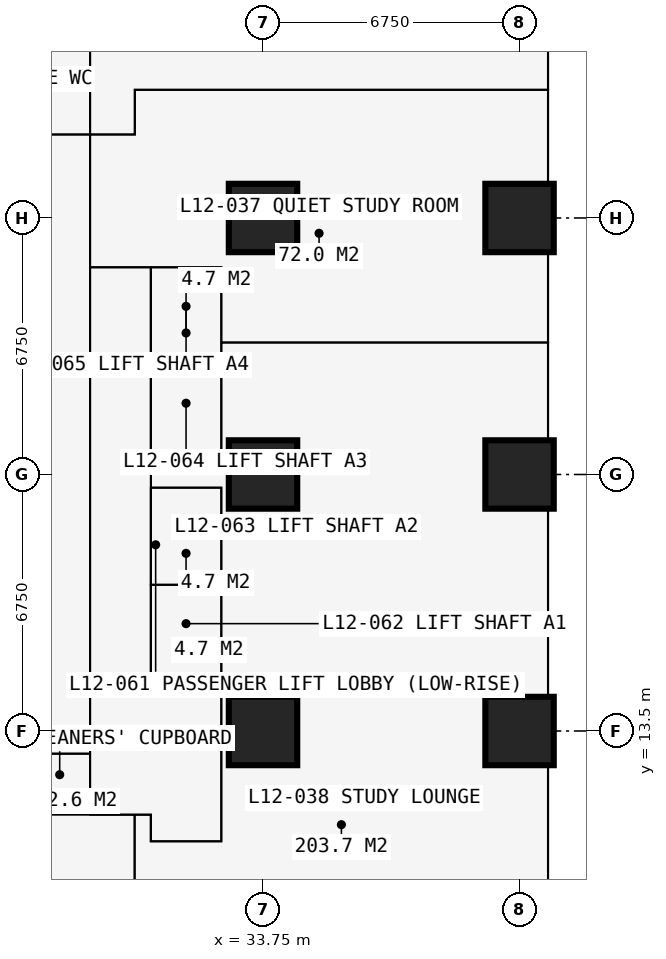
"""IFC4 building model, lengths in metres.
Left out: names, types, materials, properties, quantities, classifications, styles, units other than length and angle.
Written with IfcOpenShell. Run it as: python <this file> out.ifc"""

import sys

from ifc_helpers import new_model, si_unit, direction, frame, frame_2d, origin, origin_2d, place, context, subcontext, project, spatial, rectangle, extrude, element, fill, save


model = new_model("IFC4")
c1 = context("Model", 3, precision=1e-05, world=origin(), true_north=direction((0.0, 1.0)))
c2 = subcontext(c1, "Body", "Model", "MODEL_VIEW")
j1 = project(units=[si_unit("LENGTHUNIT", "METRE"), si_unit("PLANEANGLEUNIT", "RADIAN")], contexts=[c1])
p1 = place(None, origin())
s1 = spatial("IfcSite", under=j1, at=p1, CompositionType="ELEMENT")
p2 = place(p1, origin())
s2 = spatial("IfcBuilding", under=s1, at=p2, CompositionType="ELEMENT")
p3 = place(p2, frame((0.0, 0.0, 46.8)))
s3 = spatial("IfcBuildingStorey", under=s2, at=p3, CompositionType="ELEMENT", Elevation=46.8)
for number, where, z_axis, x_axis in (
    (1, (33.75, 13.5, 0.0), (0.0, 0.0, 1.0), (1.0, 0.0, 0.0)),
    (2, (33.75, 20.25, 0.0), (0.0, 0.0, 1.0), (1.0, 0.0, 0.0)),
    (3, (33.75, 27.0, 0.0), (0.0, 0.0, 1.0), (1.0, 0.0, 0.0)),
    (4, (40.5, 13.5, 0.0), (0.0, 0.0, 1.0), (1.0, 0.0, 0.0)),
    (5, (40.5, 20.25, 0.0), (0.0, 0.0, 1.0), (1.0, 0.0, 0.0)),
    (6, (40.5, 27.0, 0.0), (0.0, 0.0, 1.0), (1.0, 0.0, 0.0)),
):
    element("IfcColumn", number, at=place(p3, frame(where, z_axis=z_axis, x_axis=x_axis)), inside=s3, PredefinedType="COLUMN", context=c2, shape_type="SweptSolid", body=[
        extrude(rectangle(XDim=1.8, YDim=1.8, at=origin_2d()), origin(), (0.0, 0.0, 1.0), 3.6),
    ])
p4 = place(p3, frame((41.25, 20.25, 0.0), z_axis=(0.0, 0.0, 1.0), x_axis=(0.0, -1.0, 0.0)))
e7 = element("IfcWall", 7, at=p4, inside=s3, PredefinedType="SOLIDWALL", context=c2, shape_type="SweptSolid", body=[
    extrude(rectangle(XDim=6.75, YDim=0.15, at=frame_2d((3.375, 0.0))), origin(), (0.0, 0.0, 1.0), 3.375),
])
p5 = place(p4, frame((0.962, 0.0, 0.0)))
e8 = element("IfcOpeningElement", 8, at=p5, cuts=e7, PredefinedType="OPENING", context=c2, shape_type="SweptSolid", body=[
    extrude(rectangle(XDim=1.0, YDim=2.2, at=frame_2d((0.5, 1.1))), frame((0.0, 0.085, 0.0), z_axis=(0.0, -1.0, 0.0), x_axis=(1.0, 0.0, 0.0)), (0.0, 0.0, 1.0), 0.17),
])
p6 = place(p4, frame((2.025, 0.0, 0.9)))
e9 = element("IfcOpeningElement", 9, at=p6, cuts=e7, PredefinedType="OPENING", context=c2, shape_type="SweptSolid", body=[
    extrude(rectangle(XDim=1.2, YDim=1.8, at=frame_2d((0.6, 0.9))), frame((0.0, 0.085, 0.0), z_axis=(0.0, -1.0, 0.0), x_axis=(1.0, 0.0, 0.0)), (0.0, 0.0, 1.0), 0.17),
])
p7 = place(p4, frame((4.788, 0.0, 0.0)))
e10 = element("IfcOpeningElement", 10, at=p7, cuts=e7, PredefinedType="OPENING", context=c2, shape_type="SweptSolid", body=[
    extrude(rectangle(XDim=1.0, YDim=2.2, at=frame_2d((0.5, 1.1))), frame((0.0, 0.085, 0.0), z_axis=(0.0, -1.0, 0.0), x_axis=(1.0, 0.0, 0.0)), (0.0, 0.0, 1.0), 0.17),
])
p8 = place(p4, frame((3.525, 0.0, 0.9)))
e11 = element("IfcOpeningElement", 11, at=p8, cuts=e7, PredefinedType="OPENING", context=c2, shape_type="SweptSolid", body=[
    extrude(rectangle(XDim=1.2, YDim=1.8, at=frame_2d((0.6, 0.9))), frame((0.0, 0.085, 0.0), z_axis=(0.0, -1.0, 0.0), x_axis=(1.0, 0.0, 0.0)), (0.0, 0.0, 1.0), 0.17),
])
p9 = place(p3, frame((41.25, 27.0, 0.0), z_axis=(0.0, 0.0, 1.0), x_axis=(0.0, -1.0, 0.0)))
e12 = element("IfcWall", 12, at=p9, inside=s3, PredefinedType="SOLIDWALL", context=c2, shape_type="SweptSolid", body=[
    extrude(rectangle(XDim=6.75, YDim=0.15, at=frame_2d((3.375, 0.0))), origin(), (0.0, 0.0, 1.0), 3.375),
])
p10 = place(p9, frame((0.962, 0.0, 0.0)))
e13 = element("IfcOpeningElement", 13, at=p10, cuts=e12, PredefinedType="OPENING", context=c2, shape_type="SweptSolid", body=[
    extrude(rectangle(XDim=1.0, YDim=2.2, at=frame_2d((0.5, 1.1))), frame((0.0, 0.085, 0.0), z_axis=(0.0, -1.0, 0.0), x_axis=(1.0, 0.0, 0.0)), (0.0, 0.0, 1.0), 0.17),
])
p11 = place(p9, frame((2.025, 0.0, 0.9)))
e14 = element("IfcOpeningElement", 14, at=p11, cuts=e12, PredefinedType="OPENING", context=c2, shape_type="SweptSolid", body=[
    extrude(rectangle(XDim=1.2, YDim=1.8, at=frame_2d((0.6, 0.9))), frame((0.0, 0.085, 0.0), z_axis=(0.0, -1.0, 0.0), x_axis=(1.0, 0.0, 0.0)), (0.0, 0.0, 1.0), 0.17),
])
p12 = place(p9, frame((4.788, 0.0, 0.0)))
e15 = element("IfcOpeningElement", 15, at=p12, cuts=e12, PredefinedType="OPENING", context=c2, shape_type="SweptSolid", body=[
    extrude(rectangle(XDim=1.0, YDim=2.2, at=frame_2d((0.5, 1.1))), frame((0.0, 0.085, 0.0), z_axis=(0.0, -1.0, 0.0), x_axis=(1.0, 0.0, 0.0)), (0.0, 0.0, 1.0), 0.17),
])
p13 = place(p9, frame((3.525, 0.0, 0.9)))
e16 = element("IfcOpeningElement", 16, at=p13, cuts=e12, PredefinedType="OPENING", context=c2, shape_type="SweptSolid", body=[
    extrude(rectangle(XDim=1.2, YDim=1.8, at=frame_2d((0.6, 0.9))), frame((0.0, 0.085, 0.0), z_axis=(0.0, -1.0, 0.0), x_axis=(1.0, 0.0, 0.0)), (0.0, 0.0, 1.0), 0.17),
])
for number, where, z_axis, x_axis in (
    (17, (41.35, 16.875, 0.0), (0.0, 0.0, 1.0), (1.0, 0.0, 0.0)),
    (18, (41.35, 23.625, 0.0), (0.0, 0.0, 1.0), (1.0, 0.0, 0.0)),
):
    element("IfcWall", number, at=place(p3, frame(where, z_axis=z_axis, x_axis=x_axis)), inside=s3, PredefinedType="USERDEFINED", context=c2, shape_type="SweptSolid", body=[
        extrude(rectangle(XDim=2.2, YDim=1.0, at=frame_2d((1.1, 0.0))), origin(), (0.0, 0.0, 1.0), 0.9),
    ])
p14 = place(p3, frame((10.125, 11.3, 0.0), z_axis=(0.0, 0.0, 1.0), x_axis=(1.0, 0.0, 0.0)))
e19 = element("IfcWall", 19, at=p14, inside=s3, PredefinedType="PARTITIONING", context=c2, shape_type="SweptSolid", body=[
    extrude(rectangle(XDim=20.675, YDim=0.15, at=frame_2d((10.337, 0.0))), origin(), (0.0, 0.0, 1.0), 3.375),
])
p15 = place(p14, frame((11.312, 0.0, 0.0)))
e20 = element("IfcOpeningElement", 20, at=p15, cuts=e19, PredefinedType="OPENING", context=c2, shape_type="SweptSolid", body=[
    extrude(rectangle(XDim=1.0, YDim=2.2, at=frame_2d((0.5, 1.1))), frame((0.0, 0.085, 0.0), z_axis=(0.0, -1.0, 0.0), x_axis=(1.0, 0.0, 0.0)), (0.0, 0.0, 1.0), 0.17),
])
p16 = place(p3, frame((11.3, 29.2, 0.0), z_axis=(0.0, 0.0, 1.0), x_axis=(1.0, 0.0, 0.0)))
e21 = element("IfcWall", 21, at=p16, inside=s3, PredefinedType="PARTITIONING", context=c2, shape_type="SweptSolid", body=[
    extrude(rectangle(XDim=19.075, YDim=0.15, at=frame_2d((9.538, 0.0))), origin(), (0.0, 0.0, 1.0), 3.375),
])
p17 = place(p16, frame((14.25, 0.0, 0.0)))
e22 = element("IfcOpeningElement", 22, at=p17, cuts=e21, PredefinedType="OPENING", context=c2, shape_type="SweptSolid", body=[
    extrude(rectangle(XDim=1.0, YDim=2.2, at=frame_2d((0.5, 1.1))), frame((0.0, 0.085, 0.0), z_axis=(0.0, -1.0, 0.0), x_axis=(1.0, 0.0, 0.0)), (0.0, 0.0, 1.0), 0.17),
])
p18 = place(p16, frame((16.35, 0.0, 0.0)))
e23 = element("IfcOpeningElement", 23, at=p18, cuts=e21, PredefinedType="OPENING", context=c2, shape_type="SweptSolid", body=[
    extrude(rectangle(XDim=1.0, YDim=2.2, at=frame_2d((0.5, 1.1))), frame((0.0, 0.085, 0.0), z_axis=(0.0, -1.0, 0.0), x_axis=(1.0, 0.0, 0.0)), (0.0, 0.0, 1.0), 0.17),
])
p19 = place(p16, frame((8.859, 0.0, 0.0)))
e24 = element("IfcOpeningElement", 24, at=p19, cuts=e21, PredefinedType="OPENING", context=c2, shape_type="SweptSolid", body=[
    extrude(rectangle(XDim=1.5, YDim=2.2, at=frame_2d((0.75, 1.1))), frame((0.0, 0.085, 0.0), z_axis=(0.0, -1.0, 0.0), x_axis=(1.0, 0.0, 0.0)), (0.0, 0.0, 1.0), 0.17),
])
p20 = place(p3, frame((27.6, 12.9, 0.0), z_axis=(0.0, 0.0, 1.0), x_axis=(1.0, 0.0, 0.0)))
e25 = element("IfcWall", 25, at=p20, inside=s3, PredefinedType="PARTITIONING", context=c2, shape_type="SweptSolid", body=[
    extrude(rectangle(XDim=1.6, YDim=0.15, at=frame_2d((0.8, 0.0))), origin(), (0.0, 0.0, 1.0), 2.877),
])
p21 = place(p3, frame((29.2, 11.3, 0.0), z_axis=(0.0, 0.0, 1.0), x_axis=(0.0, 1.0, 0.0)))
e26 = element("IfcWall", 26, at=p21, inside=s3, PredefinedType="PARTITIONING", context=c2, shape_type="SweptSolid", body=[
    extrude(rectangle(XDim=20.3, YDim=0.15, at=frame_2d((10.15, 0.0))), origin(), (0.0, 0.0, 1.0), 3.375),
])
p22 = place(p21, frame((8.35, 0.0, 0.0)))
e27 = element("IfcOpeningElement", 27, at=p22, cuts=e26, PredefinedType="OPENING", context=c2, shape_type="SweptSolid", body=[
    extrude(rectangle(XDim=1.2, YDim=2.2, at=frame_2d((0.6, 1.1))), frame((0.0, 0.085, 0.0), z_axis=(0.0, -1.0, 0.0), x_axis=(1.0, 0.0, 0.0)), (0.0, 0.0, 1.0), 0.17),
])
p23 = place(p3, frame((29.2, 25.7, 0.0), z_axis=(0.0, 0.0, 1.0), x_axis=(1.0, 0.0, 0.0)))
e28 = element("IfcWall", 28, at=p23, inside=s3, PredefinedType="SHEAR", context=c2, shape_type="SweptSolid", body=[
    extrude(rectangle(XDim=3.45, YDim=0.1, at=frame_2d((1.725, 0.0))), origin(), (0.0, 0.0, 1.0), 3.375),
])
p24 = place(p3, frame((30.375, -0.734, 0.0), z_axis=(0.0, 0.0, 1.0), x_axis=(0.0, 1.0, 0.0)))
e29 = element("IfcWall", 29, at=p24, inside=s3, PredefinedType="PARTITIONING", context=c2, shape_type="SweptSolid", body=[
    extrude(rectangle(XDim=12.034, YDim=0.15, at=frame_2d((6.017, 0.0))), origin(), (0.0, 0.0, 1.0), 3.375),
])
p25 = place(p3, frame((30.375, 29.2, 0.0), z_axis=(0.0, 0.0, 1.0), x_axis=(0.0, 1.0, 0.0)))
e30 = element("IfcWall", 30, at=p25, inside=s3, PredefinedType="PARTITIONING", context=c2, shape_type="SweptSolid", body=[
    extrude(rectangle(XDim=1.175, YDim=0.15, at=frame_2d((0.587, 0.0))), origin(), (0.0, 0.0, 1.0), 3.375),
])
p26 = place(p3, frame((30.375, 30.375, 0.0), z_axis=(0.0, 0.0, 1.0), x_axis=(1.0, 0.0, 0.0)))
e31 = element("IfcWall", 31, at=p26, inside=s3, PredefinedType="PARTITIONING", context=c2, shape_type="SweptSolid", body=[
    extrude(rectangle(XDim=10.859, YDim=0.15, at=frame_2d((5.429, 0.0))), origin(), (0.0, 0.0, 1.0), 3.375),
])
p27 = place(p3, frame((30.8, 10.6, 0.0), z_axis=(0.0, 0.0, 1.0), x_axis=(0.0, 1.0, 0.0)))
e32 = element("IfcWall", 32, at=p27, inside=s3, PredefinedType="PARTITIONING", context=c2, shape_type="SweptSolid", body=[
    extrude(rectangle(XDim=0.7, YDim=0.15, at=frame_2d((0.35, 0.0))), origin(), (0.0, 0.0, 1.0), 3.375),
])
p28 = place(p3, frame((30.8, 10.6, 0.0), z_axis=(0.0, 0.0, 1.0), x_axis=(1.0, 0.0, 0.0)))
e33 = element("IfcWall", 33, at=p28, inside=s3, PredefinedType="PARTITIONING", context=c2, shape_type="SweptSolid", body=[
    extrude(rectangle(XDim=1.85, YDim=0.15, at=frame_2d((0.925, 0.0))), origin(), (0.0, 0.0, 1.0), 3.375),
])
p29 = place(p3, frame((30.8, 14.8, 0.0), z_axis=(0.0, 0.0, 1.0), x_axis=(0.0, 1.0, 0.0)))
e34 = element("IfcWall", 34, at=p29, inside=s3, PredefinedType="PARTITIONING", context=c2, shape_type="SweptSolid", body=[
    extrude(rectangle(XDim=10.9, YDim=0.15, at=frame_2d((5.45, 0.0))), origin(), (0.0, 0.0, 1.0), 3.375),
])
p30 = place(p29, frame((0.75, 0.0, 0.0)))
e35 = element("IfcOpeningElement", 35, at=p30, cuts=e34, PredefinedType="OPENING", context=c2, shape_type="SweptSolid", body=[
    extrude(rectangle(XDim=1.1, YDim=2.2, at=frame_2d((0.55, 1.1))), frame((0.0, 0.085, 0.0), z_axis=(0.0, -1.0, 0.0), x_axis=(1.0, 0.0, 0.0)), (0.0, 0.0, 1.0), 0.17),
])
p31 = place(p29, frame((3.25, 0.0, 0.0)))
e36 = element("IfcOpeningElement", 36, at=p31, cuts=e34, PredefinedType="OPENING", context=c2, shape_type="SweptSolid", body=[
    extrude(rectangle(XDim=1.1, YDim=2.2, at=frame_2d((0.55, 1.1))), frame((0.0, 0.085, 0.0), z_axis=(0.0, -1.0, 0.0), x_axis=(1.0, 0.0, 0.0)), (0.0, 0.0, 1.0), 0.17),
])
p32 = place(p29, frame((6.5, 0.0, 0.0)))
e37 = element("IfcOpeningElement", 37, at=p32, cuts=e34, PredefinedType="OPENING", context=c2, shape_type="SweptSolid", body=[
    extrude(rectangle(XDim=1.1, YDim=2.2, at=frame_2d((0.55, 1.1))), frame((0.0, 0.085, 0.0), z_axis=(0.0, -1.0, 0.0), x_axis=(1.0, 0.0, 0.0)), (0.0, 0.0, 1.0), 0.17),
])
p33 = place(p29, frame((9.05, 0.0, 0.0)))
e38 = element("IfcOpeningElement", 38, at=p33, cuts=e34, PredefinedType="OPENING", context=c2, shape_type="SweptSolid", body=[
    extrude(rectangle(XDim=1.1, YDim=2.2, at=frame_2d((0.55, 1.1))), frame((0.0, 0.085, 0.0), z_axis=(0.0, -1.0, 0.0), x_axis=(1.0, 0.0, 0.0)), (0.0, 0.0, 1.0), 0.17),
])
for number, where, z_axis, x_axis in (
    (39, (30.8, 14.8, 0.0), (0.0, 0.0, 1.0), (1.0, 0.0, 0.0)),
    (40, (30.8, 17.35, 0.0), (0.0, 0.0, 1.0), (1.0, 0.0, 0.0)),
    (41, (30.8, 19.9, 0.0), (0.0, 0.0, 1.0), (1.0, 0.0, 0.0)),
    (42, (30.8, 20.6, 0.0), (0.0, 0.0, 1.0), (1.0, 0.0, 0.0)),
    (43, (30.8, 23.15, 0.0), (0.0, 0.0, 1.0), (1.0, 0.0, 0.0)),
):
    element("IfcWall", number, at=place(p3, frame(where, z_axis=z_axis, x_axis=x_axis)), inside=s3, PredefinedType="SHEAR", context=c2, shape_type="SweptSolid", body=[
        extrude(rectangle(XDim=1.85, YDim=0.1, at=frame_2d((0.925, 0.0))), origin(), (0.0, 0.0, 1.0), 3.375),
    ])
p34 = place(p3, frame((32.65, 10.6, 0.0), z_axis=(0.0, 0.0, 1.0), x_axis=(0.0, 1.0, 0.0)))
e44 = element("IfcWall", 44, at=p34, inside=s3, PredefinedType="SHEAR", context=c2, shape_type="SweptSolid", body=[
    extrude(rectangle(XDim=9.3, YDim=0.1, at=frame_2d((4.65, 0.0))), origin(), (0.0, 0.0, 1.0), 3.375),
])
p35 = place(p34, frame((0.45, 0.0, 0.0)))
e45 = element("IfcOpeningElement", 45, at=p35, cuts=e44, PredefinedType="OPENING", context=c2, shape_type="SweptSolid", body=[
    extrude(rectangle(XDim=1.5, YDim=2.2, at=frame_2d((0.75, 1.1))), frame((0.0, 0.06, 0.0), z_axis=(0.0, -1.0, 0.0), x_axis=(1.0, 0.0, 0.0)), (0.0, 0.0, 1.0), 0.12),
])
p36 = place(p3, frame((32.65, 20.6, 0.0), z_axis=(0.0, 0.0, 1.0), x_axis=(0.0, 1.0, 0.0)))
e46 = element("IfcWall", 46, at=p36, inside=s3, PredefinedType="PARTITIONING", context=c2, shape_type="SweptSolid", body=[
    extrude(rectangle(XDim=5.1, YDim=0.15, at=frame_2d((2.55, 0.0))), origin(), (0.0, 0.0, 1.0), 3.375),
])
p37 = place(p3, frame((32.65, 23.72, 0.0), z_axis=(0.0, 0.0, 1.0), x_axis=(1.0, 0.0, 0.0)))
e47 = element("IfcWall", 47, at=p37, inside=s3, PredefinedType="PARTITIONING", context=c2, shape_type="SweptSolid", body=[
    extrude(rectangle(XDim=8.525, YDim=0.15, at=frame_2d((4.263, 0.0))), origin(), (0.0, 0.0, 1.0), 3.375),
])
p38 = place(p37, frame((3.5, 0.0, 0.0)))
e48 = element("IfcOpeningElement", 48, at=p38, cuts=e47, PredefinedType="OPENING", context=c2, shape_type="SweptSolid", body=[
    extrude(rectangle(XDim=1.6, YDim=2.4, at=frame_2d((0.8, 1.2))), frame((0.0, 0.085, 0.0), z_axis=(0.0, -1.0, 0.0), x_axis=(1.0, 0.0, 0.0)), (0.0, 0.0, 1.0), 0.17),
])
p39 = place(p5, origin())
e49 = element("IfcDoor", 49, at=p39, inside=s3, OperationType="SINGLE_SWING_LEFT", PredefinedType="DOOR", context=c2, shape_type="SweptSolid", body=[
    extrude(rectangle(XDim=1.0, YDim=2.2, at=frame_2d((0.5, 1.1))), frame((0.0, 0.025, 0.0), z_axis=(0.0, -1.0, 0.0), x_axis=(1.0, 0.0, 0.0)), (0.0, 0.0, 1.0), 0.05),
])
fill(e8, e49)
p40 = place(p6, origin())
e50 = element("IfcWindow", 50, at=p40, inside=s3, PartitioningType="SINGLE_PANEL", PredefinedType="WINDOW", context=c2, shape_type="SweptSolid", body=[
    extrude(rectangle(XDim=1.2, YDim=1.8, at=frame_2d((0.6, 0.9))), frame((0.0, 0.03, 0.0), z_axis=(0.0, -1.0, 0.0), x_axis=(1.0, 0.0, 0.0)), (0.0, 0.0, 1.0), 0.06),
])
fill(e9, e50)
p41 = place(p7, origin())
e51 = element("IfcDoor", 51, at=p41, inside=s3, OperationType="SINGLE_SWING_RIGHT", PredefinedType="DOOR", context=c2, shape_type="SweptSolid", body=[
    extrude(rectangle(XDim=1.0, YDim=2.2, at=frame_2d((0.5, 1.1))), frame((0.0, 0.025, 0.0), z_axis=(0.0, -1.0, 0.0), x_axis=(1.0, 0.0, 0.0)), (0.0, 0.0, 1.0), 0.05),
])
fill(e10, e51)
p42 = place(p8, origin())
e52 = element("IfcWindow", 52, at=p42, inside=s3, PartitioningType="SINGLE_PANEL", PredefinedType="WINDOW", context=c2, shape_type="SweptSolid", body=[
    extrude(rectangle(XDim=1.2, YDim=1.8, at=frame_2d((0.6, 0.9))), frame((0.0, 0.03, 0.0), z_axis=(0.0, -1.0, 0.0), x_axis=(1.0, 0.0, 0.0)), (0.0, 0.0, 1.0), 0.06),
])
fill(e11, e52)
p43 = place(p10, origin())
e53 = element("IfcDoor", 53, at=p43, inside=s3, OperationType="SINGLE_SWING_LEFT", PredefinedType="DOOR", context=c2, shape_type="SweptSolid", body=[
    extrude(rectangle(XDim=1.0, YDim=2.2, at=frame_2d((0.5, 1.1))), frame((0.0, 0.025, 0.0), z_axis=(0.0, -1.0, 0.0), x_axis=(1.0, 0.0, 0.0)), (0.0, 0.0, 1.0), 0.05),
])
fill(e13, e53)
p44 = place(p11, origin())
e54 = element("IfcWindow", 54, at=p44, inside=s3, PartitioningType="SINGLE_PANEL", PredefinedType="WINDOW", context=c2, shape_type="SweptSolid", body=[
    extrude(rectangle(XDim=1.2, YDim=1.8, at=frame_2d((0.6, 0.9))), frame((0.0, 0.03, 0.0), z_axis=(0.0, -1.0, 0.0), x_axis=(1.0, 0.0, 0.0)), (0.0, 0.0, 1.0), 0.06),
])
fill(e14, e54)
p45 = place(p12, origin())
e55 = element("IfcDoor", 55, at=p45, inside=s3, OperationType="SINGLE_SWING_RIGHT", PredefinedType="DOOR", context=c2, shape_type="SweptSolid", body=[
    extrude(rectangle(XDim=1.0, YDim=2.2, at=frame_2d((0.5, 1.1))), frame((0.0, 0.025, 0.0), z_axis=(0.0, -1.0, 0.0), x_axis=(1.0, 0.0, 0.0)), (0.0, 0.0, 1.0), 0.05),
])
fill(e15, e55)
p46 = place(p13, origin())
e56 = element("IfcWindow", 56, at=p46, inside=s3, PartitioningType="SINGLE_PANEL", PredefinedType="WINDOW", context=c2, shape_type="SweptSolid", body=[
    extrude(rectangle(XDim=1.2, YDim=1.8, at=frame_2d((0.6, 0.9))), frame((0.0, 0.03, 0.0), z_axis=(0.0, -1.0, 0.0), x_axis=(1.0, 0.0, 0.0)), (0.0, 0.0, 1.0), 0.06),
])
fill(e16, e56)
p47 = place(p38, origin())
e57 = element("IfcDoor", 57, at=p47, inside=s3, OperationType="DOUBLE_DOOR_SINGLE_SWING", PredefinedType="DOOR", context=c2, shape_type="SweptSolid", body=[
    extrude(rectangle(XDim=1.6, YDim=2.4, at=frame_2d((0.8, 1.2))), frame((0.0, 0.025, 0.0), z_axis=(0.0, -1.0, 0.0), x_axis=(1.0, 0.0, 0.0)), (0.0, 0.0, 1.0), 0.05),
])
fill(e48, e57)
p48 = place(p35, origin())
e58 = element("IfcDoor", 58, at=p48, inside=s3, OperationType="DOUBLE_DOOR_SINGLE_SWING", PredefinedType="DOOR", context=c2, shape_type="SweptSolid", body=[
    extrude(rectangle(XDim=1.5, YDim=2.2, at=frame_2d((0.75, 1.1))), frame((0.0, 0.025, 0.0), z_axis=(0.0, -1.0, 0.0), x_axis=(1.0, 0.0, 0.0)), (0.0, 0.0, 1.0), 0.05),
])
fill(e45, e58)
p49 = place(p18, origin())
e59 = element("IfcDoor", 59, at=p49, inside=s3, OperationType="SINGLE_SWING_LEFT", PredefinedType="DOOR", context=c2, shape_type="SweptSolid", body=[
    extrude(rectangle(XDim=1.0, YDim=2.2, at=frame_2d((0.5, 1.1))), frame((0.0, 0.025, 0.0), z_axis=(0.0, -1.0, 0.0), x_axis=(1.0, 0.0, 0.0)), (0.0, 0.0, 1.0), 0.05),
])
fill(e23, e59)
p50 = place(p30, origin())
e60 = element("IfcDoor", 60, at=p50, inside=s3, OperationType="DOUBLE_DOOR_SLIDING", PredefinedType="DOOR", context=c2, shape_type="SweptSolid", body=[
    extrude(rectangle(XDim=1.1, YDim=2.2, at=frame_2d((0.55, 1.1))), frame((0.0, 0.025, 0.0), z_axis=(0.0, -1.0, 0.0), x_axis=(1.0, 0.0, 0.0)), (0.0, 0.0, 1.0), 0.05),
])
fill(e35, e60)
p51 = place(p31, origin())
e61 = element("IfcDoor", 61, at=p51, inside=s3, OperationType="DOUBLE_DOOR_SLIDING", PredefinedType="DOOR", context=c2, shape_type="SweptSolid", body=[
    extrude(rectangle(XDim=1.1, YDim=2.2, at=frame_2d((0.55, 1.1))), frame((0.0, 0.025, 0.0), z_axis=(0.0, -1.0, 0.0), x_axis=(1.0, 0.0, 0.0)), (0.0, 0.0, 1.0), 0.05),
])
fill(e36, e61)
p52 = place(p32, origin())
e62 = element("IfcDoor", 62, at=p52, inside=s3, OperationType="DOUBLE_DOOR_SLIDING", PredefinedType="DOOR", context=c2, shape_type="SweptSolid", body=[
    extrude(rectangle(XDim=1.1, YDim=2.2, at=frame_2d((0.55, 1.1))), frame((0.0, 0.025, 0.0), z_axis=(0.0, -1.0, 0.0), x_axis=(1.0, 0.0, 0.0)), (0.0, 0.0, 1.0), 0.05),
])
fill(e37, e62)
p53 = place(p33, origin())
e63 = element("IfcDoor", 63, at=p53, inside=s3, OperationType="DOUBLE_DOOR_SLIDING", PredefinedType="DOOR", context=c2, shape_type="SweptSolid", body=[
    extrude(rectangle(XDim=1.1, YDim=2.2, at=frame_2d((0.55, 1.1))), frame((0.0, 0.025, 0.0), z_axis=(0.0, -1.0, 0.0), x_axis=(1.0, 0.0, 0.0)), (0.0, 0.0, 1.0), 0.05),
])
fill(e38, e63)
p54 = place(p22, origin())
e64 = element("IfcDoor", 64, at=p54, inside=s3, OperationType="DOUBLE_DOOR_SINGLE_SWING", PredefinedType="DOOR", context=c2, shape_type="SweptSolid", body=[
    extrude(rectangle(XDim=1.2, YDim=2.2, at=frame_2d((0.6, 1.1))), frame((0.0, 0.025, 0.0), z_axis=(0.0, -1.0, 0.0), x_axis=(1.0, 0.0, 0.0)), (0.0, 0.0, 1.0), 0.05),
])
fill(e27, e64)
save(model, sys.argv[1])
